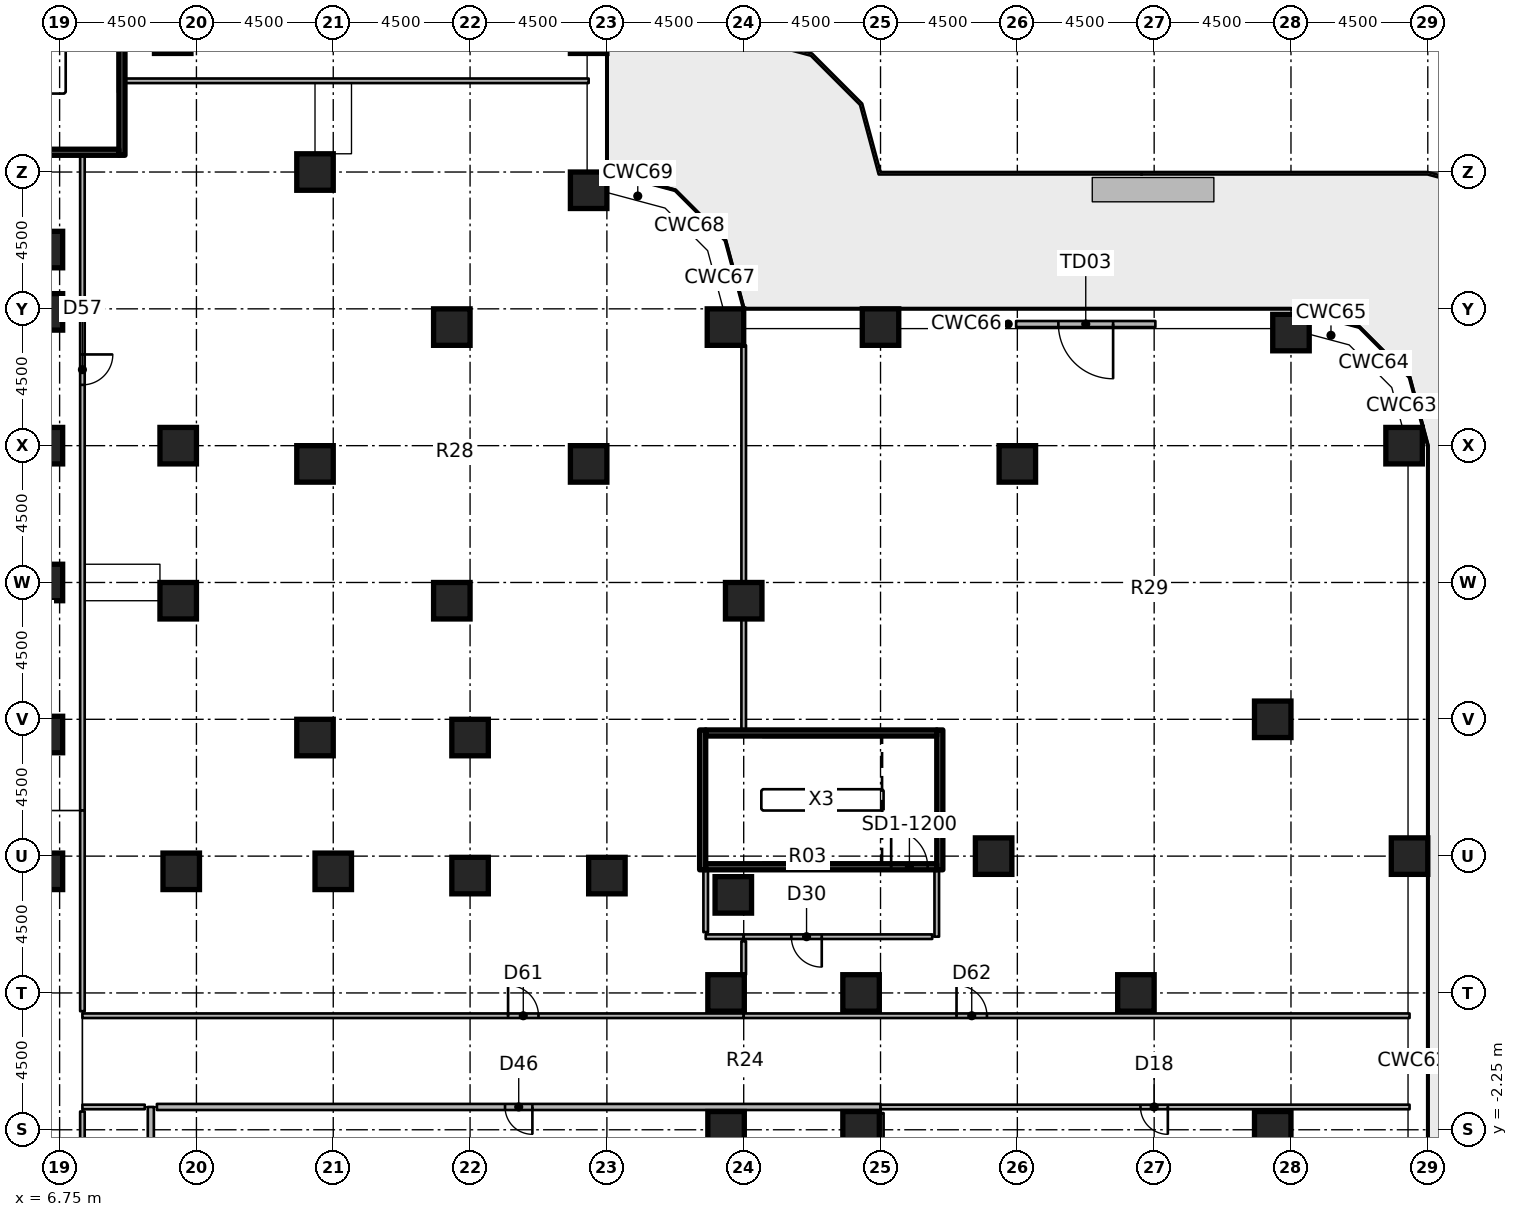
"""IFC4 building model, lengths in metres.
Left out: names, types, materials, properties, quantities, classifications, styles, units other than length and angle.
Written with IfcOpenShell. Run it as: python <this file> out.ifc"""

import sys

from ifc_helpers import new_model, si_unit, direction, frame, frame_2d, origin, origin_2d, place, context, subcontext, project, spatial, rectangle, extrude, element, fill, save


model = new_model("IFC4")
c1 = context("Model", 3, precision=1e-05, world=origin(), true_north=direction((0.0, 1.0)))
c2 = subcontext(c1, "Body", "Model", "MODEL_VIEW")
j1 = project(units=[si_unit("LENGTHUNIT", "METRE"), si_unit("PLANEANGLEUNIT", "RADIAN")], contexts=[c1])
p1 = place(None, origin())
s1 = spatial("IfcSite", under=j1, at=p1, CompositionType="ELEMENT")
p2 = place(p1, origin())
s2 = spatial("IfcBuilding", under=s1, at=p2, CompositionType="ELEMENT")
p3 = place(p2, frame((0.0, 0.0, 7.0)))
s3 = spatial("IfcBuildingStorey", under=s2, at=p3, CompositionType="ELEMENT", Elevation=7.0)
for number, where, z_axis, x_axis in (
    (1, (6.25, 6.25, 0.0), (0.0, 0.0, 1.0), (1.0, 0.0, 0.0)),
    (2, (6.25, 10.75, 0.0), (0.0, 0.0, 1.0), (1.0, 0.0, 0.0)),
    (3, (6.25, 15.75, 0.0), (0.0, 0.0, 1.0), (1.0, 0.0, 0.0)),
    (4, (6.25, 20.25, 0.0), (0.0, 0.0, 1.0), (1.0, 0.0, 0.0)),
    (5, (6.25, 24.65, 0.0), (0.0, 0.0, 1.0), (1.0, 0.0, 0.0)),
    (6, (6.25, 26.7, 0.0), (0.0, 0.0, 1.0), (1.0, 0.0, 0.0)),
    (7, (10.75, 6.25, 0.0), (0.0, 0.0, 1.0), (1.0, 0.0, 0.0)),
    (8, (10.65, 15.15, 0.0), (0.0, 0.0, 1.0), (1.0, 0.0, 0.0)),
    (9, (10.65, 20.25, 0.0), (0.0, 0.0, 1.0), (1.0, 0.0, 0.0)),
    (10, (10.47, 33.75, 0.0), (0.0, 0.0, 1.0), (1.0, 0.0, 0.0)),
    (11, (15.75, 6.25, 0.0), (0.0, 0.0, 1.0), (1.0, 0.0, 0.0)),
    (12, (15.15, 10.65, 0.0), (0.0, 0.0, 1.0), (1.0, 0.0, 0.0)),
    (13, (15.15, 19.65, 0.0), (0.0, 0.0, 1.0), (1.0, 0.0, 0.0)),
    (14, (15.15, 29.25, 0.0), (0.0, 0.0, 1.0), (1.0, 0.0, 0.0)),
    (15, (20.25, 6.11, 0.0), (0.0, 0.0, 1.0), (1.0, 0.0, 0.0)),
    (16, (20.25, 10.65, 0.0), (0.0, 0.0, 1.0), (1.0, 0.0, 0.0)),
    (17, (19.65, 15.15, 0.0), (0.0, 0.0, 1.0), (1.0, 0.0, 0.0)),
    (18, (19.65, 24.15, 0.0), (0.0, 0.0, 1.0), (1.0, 0.0, 0.0)),
    (19, (24.75, 6.11, 0.0), (0.0, 0.0, 1.0), (1.0, 0.0, 0.0)),
    (20, (24.15, 19.65, 0.0), (0.0, 0.0, 1.0), (1.0, 0.0, 0.0)),
    (21, (24.15, 28.65, 0.0), (0.0, 0.0, 1.0), (1.0, 0.0, 0.0)),
    (22, (24.15, 33.75, 0.0), (0.0, 0.0, 1.0), (1.0, 0.0, 0.0)),
    (23, (28.67, -2.25, 0.0), (0.0, 0.0, 1.0), (1.0, 0.0, 0.0)),
    (24, (28.67, 2.25, 0.0), (0.0, 0.0, 1.0), (1.0, 0.0, 0.0)),
    (25, (28.908, 5.475, 0.0), (0.0, 0.0, 1.0), (1.0, 0.0, 0.0)),
    (26, (29.25, 15.15, 0.0), (0.0, 0.0, 1.0), (1.0, 0.0, 0.0)),
    (27, (28.65, 24.15, 0.0), (0.0, 0.0, 1.0), (1.0, 0.0, 0.0)),
    (28, (33.11, -2.25, 0.0), (0.0, 0.0, 1.0), (1.0, 0.0, 0.0)),
    (29, (33.11, 2.25, 0.0), (0.0, 0.0, 1.0), (1.0, 0.0, 0.0)),
    (30, (33.75, 24.15, 0.0), (0.0, 0.0, 1.0), (1.0, 0.0, 0.0)),
    (31, (37.47, 6.75, 0.0), (0.0, 0.0, 1.0), (1.0, 0.0, 0.0)),
    (32, (38.25, 19.65, 0.0), (0.0, 0.0, 1.0), (1.0, 0.0, 0.0)),
    (33, (42.15, 2.25, 0.0), (0.0, 0.0, 1.0), (1.0, 0.0, 0.0)),
    (34, (46.65, -2.25, 0.0), (0.0, 0.0, 1.0), (1.0, 0.0, 0.0)),
    (35, (46.65, 11.25, 0.0), (0.0, 0.0, 1.0), (1.0, 0.0, 0.0)),
    (36, (47.25, 23.97, 0.0), (0.0, 0.0, 1.0), (1.0, 0.0, 0.0)),
    (37, (51.15, 6.75, 0.0), (0.0, 0.0, 1.0), (1.0, 0.0, 0.0)),
    (38, (50.97, 20.25, 0.0), (0.0, 0.0, 1.0), (1.0, 0.0, 0.0)),
):
    element("IfcColumn", number, at=place(p3, frame(where, z_axis=z_axis, x_axis=x_axis)), inside=s3, PredefinedType="COLUMN", context=c2, shape_type="SweptSolid", body=[
        extrude(rectangle(XDim=1.2, YDim=1.2, at=origin_2d()), origin(), (0.0, 0.0, 1.0), 4.55),
    ])
p4 = place(p3, frame((42.79, 24.25, 0.0), z_axis=(0.0, 0.0, 1.0), x_axis=(-1.0, 0.0, 0.0)))
e39 = element("IfcWall", 39, at=p4, inside=s3, PredefinedType="SOLIDWALL", context=c2, shape_type="SweptSolid", body=[
    extrude(rectangle(XDim=4.58, YDim=0.2, at=frame_2d((2.29, 0.0))), origin(), (0.0, 0.0, 1.0), 4.55),
])
p5 = place(p4, frame((1.39, 0.0, 0.0)))
e40 = element("IfcOpeningElement", 40, at=p5, cuts=e39, PredefinedType="OPENING", context=c2, shape_type="SweptSolid", body=[
    extrude(rectangle(XDim=1.8, YDim=2.4, at=frame_2d((0.9, 1.2))), frame((0.0, 0.11, 0.0), z_axis=(0.0, -1.0, 0.0), x_axis=(1.0, 0.0, 0.0)), (0.0, 0.0, 1.0), 0.22),
])
p6 = place(p3, frame((8.8, 29.8, 0.0), z_axis=(0.0, 0.0, 1.0), x_axis=(0.0, 1.0, 0.0)))
e41 = element("IfcWall", 41, at=p6, inside=s3, PredefinedType="SHEAR", context=c2, shape_type="SweptSolid", body=[
    extrude(rectangle(XDim=8.0, YDim=0.2, at=frame_2d((4.0, 0.0))), origin(), (0.0, 0.0, 1.0), 4.55),
])
p7 = place(p3, frame((4.5, 29.9, 0.0), z_axis=(0.0, 0.0, 1.0), x_axis=(1.0, 0.0, 0.0)))
e42 = element("IfcWall", 42, at=p7, inside=s3, PredefinedType="SHEAR", context=c2, shape_type="SweptSolid", body=[
    extrude(rectangle(XDim=4.2, YDim=0.2, at=frame_2d((2.1, 0.0))), origin(), (0.0, 0.0, 1.0), 4.55),
])
for number, where, z_axis, x_axis in (
    (43, (27.9, 6.3, 0.0), (0.0, 0.0, 1.0), (0.0, 1.0, 0.0)),
    (44, (35.7, 6.3, 0.0), (0.0, 0.0, 1.0), (0.0, 1.0, 0.0)),
):
    element("IfcWall", number, at=place(p3, frame(where, z_axis=z_axis, x_axis=x_axis)), inside=s3, PredefinedType="SHEAR", context=c2, shape_type="SweptSolid", body=[
        extrude(rectangle(XDim=4.6, YDim=0.2, at=frame_2d((2.3, 0.0))), origin(), (0.0, 0.0, 1.0), 4.55),
    ])
p8 = place(p3, frame((28.0, 6.4, 0.0), z_axis=(0.0, 0.0, 1.0), x_axis=(1.0, 0.0, 0.0)))
e45 = element("IfcWall", 45, at=p8, inside=s3, PredefinedType="SHEAR", context=c2, shape_type="SweptSolid", body=[
    extrude(rectangle(XDim=7.6, YDim=0.2, at=frame_2d((3.8, 0.0))), origin(), (0.0, 0.0, 1.0), 4.55),
])
p9 = place(p8, frame((6.1, 0.0, 0.0)))
e46 = element("IfcOpeningElement", 46, at=p9, cuts=e45, PredefinedType="OPENING", context=c2, shape_type="SweptSolid", body=[
    extrude(rectangle(XDim=1.2, YDim=2.1, at=frame_2d((0.6, 1.05))), frame((0.0, 0.11, 0.0), z_axis=(0.0, -1.0, 0.0), x_axis=(1.0, 0.0, 0.0)), (0.0, 0.0, 1.0), 0.22),
])
p10 = place(p3, frame((28.0, 10.8, 0.0), z_axis=(0.0, 0.0, 1.0), x_axis=(1.0, 0.0, 0.0)))
e47 = element("IfcWall", 47, at=p10, inside=s3, PredefinedType="SHEAR", context=c2, shape_type="SweptSolid", body=[
    extrude(rectangle(XDim=7.6, YDim=0.2, at=frame_2d((3.8, 0.0))), origin(), (0.0, 0.0, 1.0), 4.55),
])
p11 = place(p3, frame((29.25, 4.1, 0.0), z_axis=(0.0, 0.0, 1.0), x_axis=(-1.0, 0.0, 0.0)))
e48 = element("IfcWall", 48, at=p11, inside=s3, PredefinedType="PARTITIONING", context=c2, shape_type="SweptSolid", body=[
    extrude(rectangle(XDim=1.25, YDim=0.15, at=frame_2d((0.625, 0.0))), origin(), (0.0, 0.0, 1.0), 4.55),
])
p12 = place(p3, frame((28.0, 4.25, 0.0), z_axis=(0.0, 0.0, 1.0), x_axis=(0.0, 1.0, 0.0)))
e49 = element("IfcWall", 49, at=p12, inside=s3, PredefinedType="PARTITIONING", context=c2, shape_type="SweptSolid", body=[
    extrude(rectangle(XDim=2.05, YDim=0.15, at=frame_2d((1.025, 0.0))), origin(), (0.0, 0.0, 1.0), 4.55),
])
p13 = place(p3, frame((35.6, 6.3, 0.0), z_axis=(0.0, 0.0, 1.0), x_axis=(0.0, -1.0, 0.0)))
e50 = element("IfcWall", 50, at=p13, inside=s3, PredefinedType="PARTITIONING", context=c2, shape_type="SweptSolid", body=[
    extrude(rectangle(XDim=2.2, YDim=0.15, at=frame_2d((1.1, 0.0))), origin(), (0.0, 0.0, 1.0), 4.55),
])
p14 = place(p3, frame((35.45, 4.1, 0.0), z_axis=(0.0, 0.0, 1.0), x_axis=(-1.0, 0.0, 0.0)))
e51 = element("IfcWall", 51, at=p14, inside=s3, PredefinedType="PARTITIONING", context=c2, shape_type="SweptSolid", body=[
    extrude(rectangle(XDim=6.2, YDim=0.15, at=frame_2d((3.1, 0.0))), origin(), (0.0, 0.0, 1.0), 4.55),
])
p15 = place(p14, frame((3.633, 0.0, 0.0)))
e52 = element("IfcOpeningElement", 52, at=p15, cuts=e51, PredefinedType="OPENING", context=c2, shape_type="SweptSolid", body=[
    extrude(rectangle(XDim=1.0, YDim=2.1, at=frame_2d((0.5, 1.05))), frame((0.0, 0.085, 0.0), z_axis=(0.0, -1.0, 0.0), x_axis=(1.0, 0.0, 0.0)), (0.0, 0.0, 1.0), 0.17),
])
p16 = place(p3, frame((9.75, -10.8, 0.0), z_axis=(0.0, 0.0, 1.0), x_axis=(0.0, 1.0, 0.0)))
e53 = element("IfcWall", 53, at=p16, inside=s3, PredefinedType="PARTITIONING", context=c2, shape_type="SweptSolid", body=[
    extrude(rectangle(XDim=9.3, YDim=0.2, at=frame_2d((4.65, 0.0))), origin(), (0.0, 0.0, 1.0), 4.55),
])
p17 = place(p3, frame((33.75, -1.5, 0.0), z_axis=(0.0, 0.0, 1.0), x_axis=(-1.0, 0.0, 0.0)))
e54 = element("IfcWall", 54, at=p17, inside=s3, PredefinedType="PARTITIONING", context=c2, shape_type="SweptSolid", body=[
    extrude(rectangle(XDim=23.8, YDim=0.2, at=frame_2d((11.9, 0.0))), origin(), (0.0, 0.0, 1.0), 4.55),
])
p18 = place(p17, frame((11.45, 0.0, 0.0)))
e55 = element("IfcOpeningElement", 55, at=p18, cuts=e54, PredefinedType="OPENING", context=c2, shape_type="SweptSolid", body=[
    extrude(rectangle(XDim=0.9, YDim=2.1, at=frame_2d((0.45, 1.05))), frame((0.0, 0.11, 0.0), z_axis=(0.0, -1.0, 0.0), x_axis=(1.0, 0.0, 0.0)), (0.0, 0.0, 1.0), 0.22),
])
p19 = place(p3, frame((33.75, -1.7, 0.0), z_axis=(0.0, 0.0, 1.0), x_axis=(0.0, -1.0, 0.0)))
e56 = element("IfcWall", 56, at=p19, inside=s3, PredefinedType="PARTITIONING", context=c2, shape_type="SweptSolid", body=[
    extrude(rectangle(XDim=2.0, YDim=0.2, at=frame_2d((1.0, 0.0))), origin(), (0.0, 0.0, 1.0), 4.55),
])
p20 = place(p3, frame((7.5, -1.5, 0.0), z_axis=(0.0, 0.0, 1.0), x_axis=(1.0, 0.0, 0.0)))
e57 = element("IfcWall", 57, at=p20, inside=s3, PredefinedType="PARTITIONING", context=c2, shape_type="SweptSolid", body=[
    extrude(rectangle(XDim=2.05, YDim=0.15, at=frame_2d((1.025, 0.0))), origin(), (0.0, 0.0, 1.0), 4.55),
])
p21 = place(p3, frame((7.5, -1.65, 0.0), z_axis=(0.0, 0.0, 1.0), x_axis=(0.0, -1.0, 0.0)))
e58 = element("IfcWall", 58, at=p21, inside=s3, PredefinedType="PARTITIONING", context=c2, shape_type="SweptSolid", body=[
    extrude(rectangle(XDim=6.6, YDim=0.15, at=frame_2d((3.3, 0.0))), origin(), (0.0, 0.0, 1.0), 4.55),
])
p22 = place(p21, frame((2.85, 0.0, 0.0)))
e59 = element("IfcOpeningElement", 59, at=p22, cuts=e58, PredefinedType="OPENING", context=c2, shape_type="SweptSolid", body=[
    extrude(rectangle(XDim=0.9, YDim=2.1, at=frame_2d((0.45, 1.05))), frame((0.0, 0.085, 0.0), z_axis=(0.0, -1.0, 0.0), x_axis=(1.0, 0.0, 0.0)), (0.0, 0.0, 1.0), 0.17),
])
p23 = place(p3, frame((7.5, 30.0, 0.0), z_axis=(0.0, 0.0, 1.0), x_axis=(0.0, -1.0, 0.0)))
e60 = element("IfcWall", 60, at=p23, inside=s3, PredefinedType="PARTITIONING", context=c2, shape_type="SweptSolid", body=[
    extrude(rectangle(XDim=21.75, YDim=0.15, at=frame_2d((10.875, 0.0))), origin(), (0.0, 0.0, 1.0), 4.55),
])
p24 = place(p23, frame((6.75, 0.0, 0.0)))
e61 = element("IfcOpeningElement", 61, at=p24, cuts=e60, PredefinedType="OPENING", context=c2, shape_type="SweptSolid", body=[
    extrude(rectangle(XDim=1.0, YDim=2.1, at=frame_2d((0.5, 1.05))), frame((0.0, 0.085, 0.0), z_axis=(0.0, -1.0, 0.0), x_axis=(1.0, 0.0, 0.0)), (0.0, 0.0, 1.0), 0.17),
])
p25 = place(p3, frame((7.5, 1.5, 0.0), z_axis=(0.0, 0.0, 1.0), x_axis=(1.0, 0.0, 0.0)))
e62 = element("IfcWall", 62, at=p25, inside=s3, PredefinedType="PARTITIONING", context=c2, shape_type="SweptSolid", body=[
    extrude(rectangle(XDim=21.75, YDim=0.15, at=frame_2d((10.875, 0.0))), origin(), (0.0, 0.0, 1.0), 4.55),
])
p26 = place(p25, frame((14.0, 0.0, 0.0)))
e63 = element("IfcOpeningElement", 63, at=p26, cuts=e62, PredefinedType="OPENING", context=c2, shape_type="SweptSolid", body=[
    extrude(rectangle(XDim=1.0, YDim=2.1, at=frame_2d((0.5, 1.05))), frame((0.0, 0.085, 0.0), z_axis=(0.0, -1.0, 0.0), x_axis=(1.0, 0.0, 0.0)), (0.0, 0.0, 1.0), 0.17),
])
p27 = place(p3, frame((29.25, 1.5, 0.0), z_axis=(0.0, 0.0, 1.0), x_axis=(1.0, 0.0, 0.0)))
e64 = element("IfcWall", 64, at=p27, inside=s3, PredefinedType="PARTITIONING", context=c2, shape_type="SweptSolid", body=[
    extrude(rectangle(XDim=21.9, YDim=0.15, at=frame_2d((10.95, 0.0))), origin(), (0.0, 0.0, 1.0), 4.55),
])
p28 = place(p27, frame((7.0, 0.0, 0.0)))
e65 = element("IfcOpeningElement", 65, at=p28, cuts=e64, PredefinedType="OPENING", context=c2, shape_type="SweptSolid", body=[
    extrude(rectangle(XDim=1.0, YDim=2.1, at=frame_2d((0.5, 1.05))), frame((0.0, 0.085, 0.0), z_axis=(0.0, -1.0, 0.0), x_axis=(1.0, 0.0, 0.0)), (0.0, 0.0, 1.0), 0.17),
])
p29 = place(p3, frame((51.15, -1.5, 0.0), z_axis=(0.0, 0.0, 1.0), x_axis=(-1.0, 0.0, 0.0)))
e66 = element("IfcWall", 66, at=p29, inside=s3, PredefinedType="PARTITIONING", context=c2, shape_type="SweptSolid", body=[
    extrude(rectangle(XDim=17.4, YDim=0.15, at=frame_2d((8.7, 0.0))), origin(), (0.0, 0.0, 1.0), 4.55),
])
p30 = place(p29, frame((7.95, 0.0, 0.0)))
e67 = element("IfcOpeningElement", 67, at=p30, cuts=e66, PredefinedType="OPENING", context=c2, shape_type="SweptSolid", body=[
    extrude(rectangle(XDim=0.9, YDim=2.1, at=frame_2d((0.45, 1.05))), frame((0.0, 0.085, 0.0), z_axis=(0.0, -1.0, 0.0), x_axis=(1.0, 0.0, 0.0)), (0.0, 0.0, 1.0), 0.17),
])
p31 = place(p3, frame((29.25, 3.95, 0.0), z_axis=(0.0, 0.0, 1.0), x_axis=(0.0, -1.0, 0.0)))
e68 = element("IfcWall", 68, at=p31, inside=s3, PredefinedType="PARTITIONING", context=c2, shape_type="SweptSolid", body=[
    extrude(rectangle(XDim=1.1, YDim=0.15, at=frame_2d((0.55, 0.0))), origin(), (0.0, 0.0, 1.0), 4.55),
])
p32 = place(p3, frame((29.25, 23.55, 0.0), z_axis=(0.0, 0.0, 1.0), x_axis=(0.0, -1.0, 0.0)))
e69 = element("IfcWall", 69, at=p32, inside=s3, PredefinedType="PARTITIONING", context=c2, shape_type="SweptSolid", body=[
    extrude(rectangle(XDim=7.8, YDim=0.15, at=frame_2d((3.9, 0.0))), origin(), (0.0, 0.0, 1.0), 4.55),
])
p33 = place(p3, frame((29.25, 14.55, 0.0), z_axis=(0.0, 0.0, 1.0), x_axis=(0.0, -1.0, 0.0)))
e70 = element("IfcWall", 70, at=p33, inside=s3, PredefinedType="PARTITIONING", context=c2, shape_type="SweptSolid", body=[
    extrude(rectangle(XDim=3.65, YDim=0.15, at=frame_2d((1.825, 0.0))), origin(), (0.0, 0.0, 1.0), 4.55),
])
p34 = place(p3, frame((8.9, 32.25, 0.0), z_axis=(0.0, 0.0, 1.0), x_axis=(1.0, 0.0, 0.0)))
e71 = element("IfcWall", 71, at=p34, inside=s3, PredefinedType="PARTITIONING", context=c2, shape_type="SweptSolid", body=[
    extrude(rectangle(XDim=15.25, YDim=0.15, at=frame_2d((7.625, 0.0))), origin(), (0.0, 0.0, 1.0), 4.55),
])
p35 = place(p3, frame((7.5, 1.65, 0.0), z_axis=(0.0, 0.0, 1.0), x_axis=(0.0, 1.0, 0.0)))
e72 = element("IfcWall", 72, at=p35, inside=s3, PredefinedType="PARTITIONING", context=c2, shape_type="SweptSolid", body=[
    extrude(rectangle(XDim=6.6, YDim=0.15, at=frame_2d((3.3, 0.0))), origin(), (0.0, 0.0, 1.0), 4.55),
])
p36 = place(p5, origin())
e73 = element("IfcDoor", 73, at=p36, inside=s3, OperationType="SINGLE_SWING_LEFT", PredefinedType="DOOR", context=c2, shape_type="SweptSolid", body=[
    extrude(rectangle(XDim=1.8, YDim=2.4, at=frame_2d((0.9, 1.2))), frame((0.0, 0.025, 0.0), z_axis=(0.0, -1.0, 0.0), x_axis=(1.0, 0.0, 0.0)), (0.0, 0.0, 1.0), 0.05),
])
fill(e40, e73)
p37 = place(p9, origin())
e74 = element("IfcDoor", 74, at=p37, inside=s3, OperationType="SINGLE_SWING_RIGHT", PredefinedType="DOOR", context=c2, shape_type="SweptSolid", body=[
    extrude(rectangle(XDim=1.2, YDim=2.1, at=frame_2d((0.6, 1.05))), frame((0.0, 0.025, 0.0), z_axis=(0.0, -1.0, 0.0), x_axis=(1.0, 0.0, 0.0)), (0.0, 0.0, 1.0), 0.05),
])
fill(e46, e74)
p38 = place(p15, origin())
e75 = element("IfcDoor", 75, at=p38, inside=s3, OperationType="SINGLE_SWING_LEFT", PredefinedType="DOOR", context=c2, shape_type="SweptSolid", body=[
    extrude(rectangle(XDim=1.0, YDim=2.1, at=frame_2d((0.5, 1.05))), frame((0.0, 0.025, 0.0), z_axis=(0.0, -1.0, 0.0), x_axis=(1.0, 0.0, 0.0)), (0.0, 0.0, 1.0), 0.05),
])
fill(e52, e75)
p39 = place(p18, origin())
e76 = element("IfcDoor", 76, at=p39, inside=s3, OperationType="SINGLE_SWING_LEFT", PredefinedType="DOOR", context=c2, shape_type="SweptSolid", body=[
    extrude(rectangle(XDim=0.9, YDim=2.1, at=frame_2d((0.45, 1.05))), frame((0.0, 0.025, 0.0), z_axis=(0.0, -1.0, 0.0), x_axis=(1.0, 0.0, 0.0)), (0.0, 0.0, 1.0), 0.05),
])
fill(e55, e76)
p40 = place(p24, origin())
e77 = element("IfcDoor", 77, at=p40, inside=s3, OperationType="SINGLE_SWING_LEFT", PredefinedType="DOOR", context=c2, shape_type="SweptSolid", body=[
    extrude(rectangle(XDim=1.0, YDim=2.1, at=frame_2d((0.5, 1.05))), frame((0.0, 0.025, 0.0), z_axis=(0.0, -1.0, 0.0), x_axis=(1.0, 0.0, 0.0)), (0.0, 0.0, 1.0), 0.05),
])
fill(e61, e77)
p41 = place(p26, origin())
e78 = element("IfcDoor", 78, at=p41, inside=s3, OperationType="SINGLE_SWING_LEFT", PredefinedType="DOOR", context=c2, shape_type="SweptSolid", body=[
    extrude(rectangle(XDim=1.0, YDim=2.1, at=frame_2d((0.5, 1.05))), frame((0.0, 0.025, 0.0), z_axis=(0.0, -1.0, 0.0), x_axis=(1.0, 0.0, 0.0)), (0.0, 0.0, 1.0), 0.05),
])
fill(e63, e78)
p42 = place(p28, origin())
e79 = element("IfcDoor", 79, at=p42, inside=s3, OperationType="SINGLE_SWING_LEFT", PredefinedType="DOOR", context=c2, shape_type="SweptSolid", body=[
    extrude(rectangle(XDim=1.0, YDim=2.1, at=frame_2d((0.5, 1.05))), frame((0.0, 0.025, 0.0), z_axis=(0.0, -1.0, 0.0), x_axis=(1.0, 0.0, 0.0)), (0.0, 0.0, 1.0), 0.05),
])
fill(e65, e79)
p43 = place(p30, origin())
e80 = element("IfcDoor", 80, at=p43, inside=s3, OperationType="SINGLE_SWING_LEFT", PredefinedType="DOOR", context=c2, shape_type="SweptSolid", body=[
    extrude(rectangle(XDim=0.9, YDim=2.1, at=frame_2d((0.45, 1.05))), frame((0.0, 0.025, 0.0), z_axis=(0.0, -1.0, 0.0), x_axis=(1.0, 0.0, 0.0)), (0.0, 0.0, 1.0), 0.05),
])
fill(e67, e80)
save(model, sys.argv[1])
